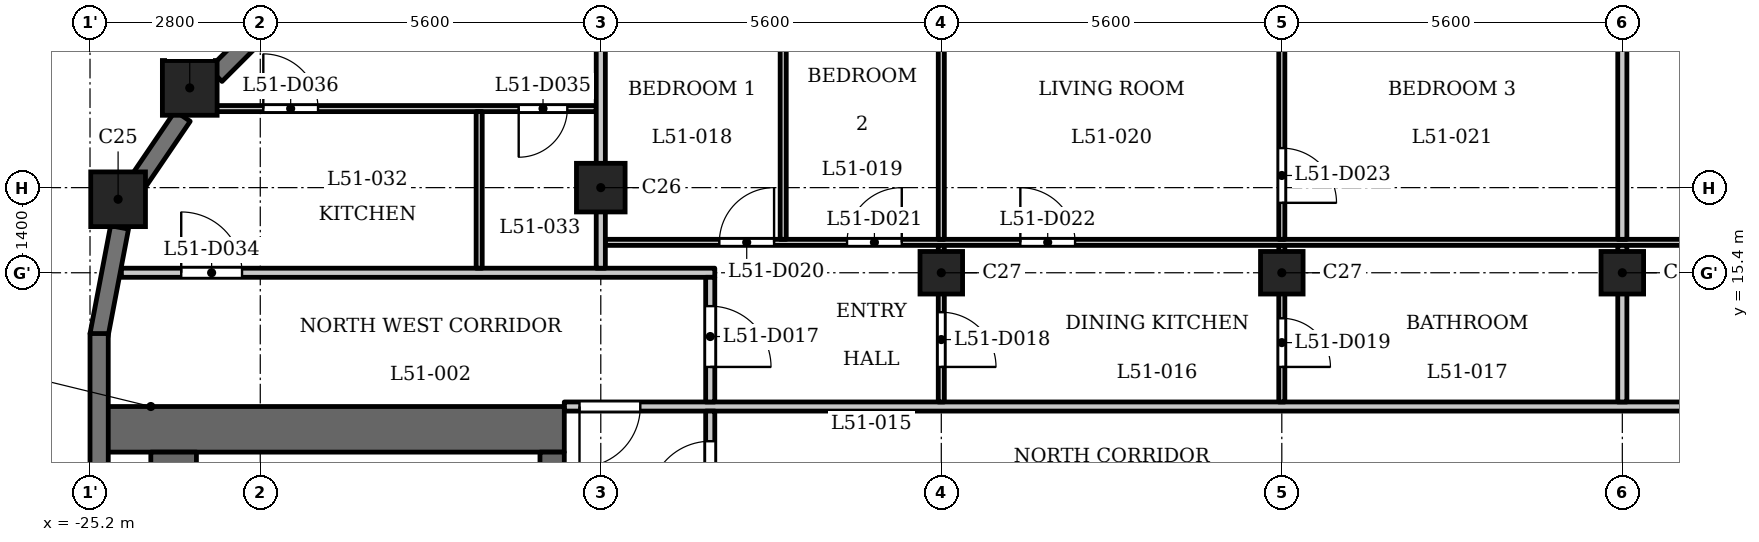
"""IFC4 building model, lengths in metres.
Left out: names, types, materials, properties, quantities, classifications, styles, units other than length and angle.
Written with IfcOpenShell. Run it as: python <this file> out.ifc"""

import sys

from ifc_helpers import new_model, si_unit, direction, frame, frame_2d, origin, origin_2d, place, context, subcontext, project, spatial, rectangle, extrude, element, fill, save


model = new_model("IFC4")
c1 = context("Model", 3, precision=1e-05, world=origin(), true_north=direction((0.0, 1.0)))
c2 = subcontext(c1, "Body", "Model", "MODEL_VIEW")
j1 = project(units=[si_unit("LENGTHUNIT", "METRE"), si_unit("PLANEANGLEUNIT", "RADIAN")], contexts=[c1])
p1 = place(None, origin())
s1 = spatial("IfcSite", under=j1, at=p1, CompositionType="ELEMENT")
p2 = place(p1, origin())
s2 = spatial("IfcBuilding", under=s1, at=p2, CompositionType="ELEMENT")
p3 = place(p2, frame((0.0, 0.0, 199.4)))
s3 = spatial("IfcBuildingStorey", under=s2, at=p3, CompositionType="ELEMENT", Elevation=199.4)
for number, where, z_axis, x_axis in (
    (1, (-23.56, 18.44, 0.0), (0.0, 0.0, 1.0), (1.0, 0.0, 0.0)),
    (2, (-24.738, 16.609, 0.0), (0.0, 0.0, 1.0), (1.0, 0.0, 0.0)),
):
    element("IfcColumn", number, at=place(p3, frame(where, z_axis=z_axis, x_axis=x_axis)), inside=s3, PredefinedType="COLUMN", context=c2, shape_type="SweptSolid", body=[
        extrude(rectangle(XDim=0.9, YDim=0.9, at=origin_2d()), origin(), (0.0, 0.0, 1.0), 3.5),
    ])
p4 = place(p3, frame((-16.8, 16.8, 0.0), z_axis=(0.0, 0.0, 1.0), x_axis=(1.0, 0.0, 0.0)))
e3 = element("IfcColumn", 3, at=p4, inside=s3, PredefinedType="COLUMN", context=c2, shape_type="SweptSolid", body=[
    extrude(rectangle(XDim=0.8, YDim=0.8, at=origin_2d()), origin(), (0.0, 0.0, 1.0), 3.5),
])
for number, where, z_axis, x_axis in (
    (4, (-11.2, 15.4, 0.0), (0.0, 0.0, 1.0), (1.0, 0.0, 0.0)),
    (5, (-5.6, 15.4, 0.0), (0.0, 0.0, 1.0), (1.0, 0.0, 0.0)),
    (6, (0.0, 15.4, 0.0), (0.0, 0.0, 1.0), (1.0, 0.0, 0.0)),
):
    element("IfcColumn", number, at=place(p3, frame(where, z_axis=z_axis, x_axis=x_axis)), inside=s3, PredefinedType="COLUMN", context=c2, shape_type="SweptSolid", body=[
        extrude(rectangle(XDim=0.7, YDim=0.7, at=origin_2d()), origin(), (0.0, 0.0, 1.0), 3.5),
    ])
p5 = place(p3, frame((-21.191, 20.597, 0.0), z_axis=(0.0, 0.0, 1.0), x_axis=(-0.707106781187, -0.707106781187, 0.0)))
e7 = element("IfcWall", 7, at=p5, inside=s3, PredefinedType="SOLIDWALL", context=c2, shape_type="SweptSolid", body=[
    extrude(rectangle(XDim=2.75, YDim=0.3, at=frame_2d((1.375, 0.0))), origin(), (0.0, 0.0, 1.0), 2.5),
])
p6 = place(p5, frame((0.775, 0.0, 0.6)))
e8 = element("IfcOpeningElement", 8, at=p6, cuts=e7, PredefinedType="OPENING", context=c2, shape_type="SweptSolid", body=[
    extrude(rectangle(XDim=1.2, YDim=1.55, at=frame_2d((0.6, 0.775))), frame((0.0, 0.16, 0.0), z_axis=(0.0, -1.0, 0.0), x_axis=(1.0, 0.0, 0.0)), (0.0, 0.0, 1.0), 0.32),
])
p7 = place(p3, frame((-23.676, 17.975, 0.0), z_axis=(0.0, 0.0, 1.0), x_axis=(-0.56200149592, -0.827136215253, 0.0)))
e9 = element("IfcWall", 9, at=p7, inside=s3, PredefinedType="SOLIDWALL", context=c2, shape_type="SweptSolid", body=[
    extrude(rectangle(XDim=1.277, YDim=0.3, at=frame_2d((0.639, 0.0))), origin(), (0.0, 0.0, 1.0), 2.5),
])
p8 = place(p3, frame((-24.714, 16.146, 0.0), z_axis=(0.0, 0.0, 1.0), x_axis=(-0.187348135549, -0.982293579388, 0.0)))
e10 = element("IfcWall", 10, at=p8, inside=s3, PredefinedType="SOLIDWALL", context=c2, shape_type="SweptSolid", body=[
    extrude(rectangle(XDim=1.806, YDim=0.3, at=frame_2d((0.903, 0.0))), origin(), (0.0, 0.0, 1.0), 2.5),
])
p9 = place(p3, frame((-25.05, 14.4, 0.0), z_axis=(0.0, 0.0, 1.0), x_axis=(0.0, -1.0, 0.0)))
e11 = element("IfcWall", 11, at=p9, inside=s3, PredefinedType="SOLIDWALL", context=c2, shape_type="SweptSolid", body=[
    extrude(rectangle(XDim=2.75, YDim=0.3, at=frame_2d((1.375, 0.0))), origin(), (0.0, 0.0, 1.0), 2.5),
])
p10 = place(p3, frame((-17.4, 12.825, 0.0), z_axis=(0.0, 0.0, 1.0), x_axis=(-1.0, 0.0, 0.0)))
e12 = element("IfcWall", 12, at=p10, inside=s3, PredefinedType="SHEAR", context=c2, shape_type="SweptSolid", body=[
    extrude(rectangle(XDim=7.6, YDim=0.75, at=frame_2d((3.8, 0.0))), origin(), (0.0, 0.0, 1.0), 3.2),
])
p11 = place(p3, frame((-17.6, -12.45, 0.0), z_axis=(0.0, 0.0, 1.0), x_axis=(0.0, 1.0, 0.0)))
e13 = element("IfcWall", 13, at=p11, inside=s3, PredefinedType="SHEAR", context=c2, shape_type="SweptSolid", body=[
    extrude(rectangle(XDim=24.9, YDim=0.4, at=frame_2d((12.45, 0.0))), origin(), (0.0, 0.0, 1.0), 3.2),
])
p12 = place(p11, frame((8.65, 0.0, 0.0)))
e14 = element("IfcOpeningElement", 14, at=p12, cuts=e13, PredefinedType="OPENING", context=c2, shape_type="SweptSolid", body=[
    extrude(rectangle(XDim=0.9, YDim=2.1, at=frame_2d((0.45, 1.05))), frame((0.0, 0.21, 0.0), z_axis=(0.0, -1.0, 0.0), x_axis=(1.0, 0.0, 0.0)), (0.0, 0.0, 1.0), 0.42),
])
p13 = place(p11, frame((15.6, 0.0, 0.0)))
e15 = element("IfcOpeningElement", 15, at=p13, cuts=e13, PredefinedType="OPENING", context=c2, shape_type="SweptSolid", body=[
    extrude(rectangle(XDim=1.1, YDim=2.1, at=frame_2d((0.55, 1.05))), frame((0.0, 0.21, 0.0), z_axis=(0.0, -1.0, 0.0), x_axis=(1.0, 0.0, 0.0)), (0.0, 0.0, 1.0), 0.42),
])
p14 = place(p11, frame((18.0, 0.0, 0.0)))
e16 = element("IfcOpeningElement", 16, at=p14, cuts=e13, PredefinedType="OPENING", context=c2, shape_type="SweptSolid", body=[
    extrude(rectangle(XDim=1.1, YDim=2.1, at=frame_2d((0.55, 1.05))), frame((0.0, 0.21, 0.0), z_axis=(0.0, -1.0, 0.0), x_axis=(1.0, 0.0, 0.0)), (0.0, 0.0, 1.0), 0.42),
])
p15 = place(p11, frame((23.025, 0.0, 0.0)))
e17 = element("IfcOpeningElement", 17, at=p15, cuts=e13, PredefinedType="OPENING", context=c2, shape_type="SweptSolid", body=[
    extrude(rectangle(XDim=1.1, YDim=2.1, at=frame_2d((0.55, 1.05))), frame((0.0, 0.21, 0.0), z_axis=(0.0, -1.0, 0.0), x_axis=(1.0, 0.0, 0.0)), (0.0, 0.0, 1.0), 0.42),
])
p16 = place(p11, frame((0.775, 0.0, 0.0)))
e18 = element("IfcOpeningElement", 18, at=p16, cuts=e13, PredefinedType="OPENING", context=c2, shape_type="SweptSolid", body=[
    extrude(rectangle(XDim=1.1, YDim=2.1, at=frame_2d((0.55, 1.05))), frame((0.0, 0.21, 0.0), z_axis=(0.0, -1.0, 0.0), x_axis=(1.0, 0.0, 0.0)), (0.0, 0.0, 1.0), 0.42),
])
p17 = place(p11, frame((12.925, 0.0, 0.0)))
e19 = element("IfcOpeningElement", 19, at=p17, cuts=e13, PredefinedType="OPENING", context=c2, shape_type="SweptSolid", body=[
    extrude(rectangle(XDim=1.8, YDim=2.1, at=frame_2d((0.9, 1.05))), frame((0.0, 0.21, 0.0), z_axis=(0.0, -1.0, 0.0), x_axis=(1.0, 0.0, 0.0)), (0.0, 0.0, 1.0), 0.42),
])
p18 = place(p3, frame((-23.825, -12.45, 0.0), z_axis=(0.0, 0.0, 1.0), x_axis=(0.0, 1.0, 0.0)))
e20 = element("IfcWall", 20, at=p18, inside=s3, PredefinedType="SHEAR", context=c2, shape_type="SweptSolid", body=[
    extrude(rectangle(XDim=24.9, YDim=0.75, at=frame_2d((12.45, 0.0))), origin(), (0.0, 0.0, 1.0), 3.2),
])
p19 = place(p3, frame((-17.4, 13.2, 0.0), z_axis=(0.0, 0.0, 1.0), x_axis=(1.0, 0.0, 0.0)))
e21 = element("IfcWall", 21, at=p19, inside=s3, PredefinedType="PARTITIONING", context=c2, shape_type="SweptSolid", body=[
    extrude(rectangle(XDim=34.8, YDim=0.15, at=frame_2d((17.4, 0.0))), origin(), (0.0, 0.0, 1.0), 3.2),
])
p20 = place(p19, frame((0.25, 0.0, 0.0)))
e22 = element("IfcOpeningElement", 22, at=p20, cuts=e21, PredefinedType="OPENING", context=c2, shape_type="SweptSolid", body=[
    extrude(rectangle(XDim=1.0, YDim=2.1, at=frame_2d((0.5, 1.05))), frame((0.0, 0.085, 0.0), z_axis=(0.0, -1.0, 0.0), x_axis=(1.0, 0.0, 0.0)), (0.0, 0.0, 1.0), 0.17),
])
p21 = place(p19, frame((33.65, 0.0, 0.0)))
e23 = element("IfcOpeningElement", 23, at=p21, cuts=e21, PredefinedType="OPENING", context=c2, shape_type="SweptSolid", body=[
    extrude(rectangle(XDim=1.0, YDim=2.1, at=frame_2d((0.5, 1.05))), frame((0.0, 0.085, 0.0), z_axis=(0.0, -1.0, 0.0), x_axis=(1.0, 0.0, 0.0)), (0.0, 0.0, 1.0), 0.17),
])
p22 = place(p3, frame((-24.684, 15.4, 0.0), z_axis=(0.0, 0.0, 1.0), x_axis=(1.0, 0.0, 0.0)))
e24 = element("IfcWall", 24, at=p22, inside=s3, PredefinedType="PARTITIONING", context=c2, shape_type="SweptSolid", body=[
    extrude(rectangle(XDim=9.759, YDim=0.15, at=frame_2d((4.879, 0.0))), origin(), (0.0, 0.0, 1.0), 3.2),
])
p23 = place(p22, frame((0.984, 0.0, 0.0)))
e25 = element("IfcOpeningElement", 25, at=p23, cuts=e24, PredefinedType="OPENING", context=c2, shape_type="SweptSolid", body=[
    extrude(rectangle(XDim=1.0, YDim=2.1, at=frame_2d((0.5, 1.05))), frame((0.0, 0.085, 0.0), z_axis=(0.0, -1.0, 0.0), x_axis=(1.0, 0.0, 0.0)), (0.0, 0.0, 1.0), 0.17),
])
p24 = place(p3, frame((-16.725, 15.9, 0.0), z_axis=(0.0, 0.0, 1.0), x_axis=(1.0, 0.0, 0.0)))
e26 = element("IfcWall", 26, at=p24, inside=s3, PredefinedType="PARTITIONING", context=c2, shape_type="SweptSolid", body=[
    extrude(rectangle(XDim=33.45, YDim=0.1, at=frame_2d((16.725, 0.0))), origin(), (0.0, 0.0, 1.0), 3.2),
])
p25 = place(p24, frame((1.875, 0.0, 0.0)))
e27 = element("IfcOpeningElement", 27, at=p25, cuts=e26, PredefinedType="OPENING", context=c2, shape_type="SweptSolid", body=[
    extrude(rectangle(XDim=0.9, YDim=2.1, at=frame_2d((0.45, 1.05))), frame((0.0, 0.06, 0.0), z_axis=(0.0, -1.0, 0.0), x_axis=(1.0, 0.0, 0.0)), (0.0, 0.0, 1.0), 0.12),
])
p26 = place(p24, frame((3.975, 0.0, 0.0)))
e28 = element("IfcOpeningElement", 28, at=p26, cuts=e26, PredefinedType="OPENING", context=c2, shape_type="SweptSolid", body=[
    extrude(rectangle(XDim=0.9, YDim=2.1, at=frame_2d((0.45, 1.05))), frame((0.0, 0.06, 0.0), z_axis=(0.0, -1.0, 0.0), x_axis=(1.0, 0.0, 0.0)), (0.0, 0.0, 1.0), 0.12),
])
p27 = place(p24, frame((6.825, 0.0, 0.0)))
e29 = element("IfcOpeningElement", 29, at=p27, cuts=e26, PredefinedType="OPENING", context=c2, shape_type="SweptSolid", body=[
    extrude(rectangle(XDim=0.9, YDim=2.1, at=frame_2d((0.45, 1.05))), frame((0.0, 0.06, 0.0), z_axis=(0.0, -1.0, 0.0), x_axis=(1.0, 0.0, 0.0)), (0.0, 0.0, 1.0), 0.12),
])
p28 = place(p24, frame((28.975, 0.0, 0.0)))
e30 = element("IfcOpeningElement", 30, at=p28, cuts=e26, PredefinedType="OPENING", context=c2, shape_type="SweptSolid", body=[
    extrude(rectangle(XDim=0.9, YDim=2.1, at=frame_2d((0.45, 1.05))), frame((0.0, 0.06, 0.0), z_axis=(0.0, -1.0, 0.0), x_axis=(1.0, 0.0, 0.0)), (0.0, 0.0, 1.0), 0.12),
])
p29 = place(p24, frame((30.725, 0.0, 0.0)))
e31 = element("IfcOpeningElement", 31, at=p29, cuts=e26, PredefinedType="OPENING", context=c2, shape_type="SweptSolid", body=[
    extrude(rectangle(XDim=0.9, YDim=2.1, at=frame_2d((0.45, 1.05))), frame((0.0, 0.06, 0.0), z_axis=(0.0, -1.0, 0.0), x_axis=(1.0, 0.0, 0.0)), (0.0, 0.0, 1.0), 0.12),
])
p30 = place(p24, frame((25.625, 0.0, 0.0)))
e32 = element("IfcOpeningElement", 32, at=p30, cuts=e26, PredefinedType="OPENING", context=c2, shape_type="SweptSolid", body=[
    extrude(rectangle(XDim=0.9, YDim=2.1, at=frame_2d((0.45, 1.05))), frame((0.0, 0.06, 0.0), z_axis=(0.0, -1.0, 0.0), x_axis=(1.0, 0.0, 0.0)), (0.0, 0.0, 1.0), 0.12),
])
p31 = place(p3, frame((-23.64, 18.1, 0.0), z_axis=(0.0, 0.0, 1.0), x_axis=(1.0, 0.0, 0.0)))
e33 = element("IfcWall", 33, at=p31, inside=s3, PredefinedType="PARTITIONING", context=c2, shape_type="SweptSolid", body=[
    extrude(rectangle(XDim=6.765, YDim=0.1, at=frame_2d((3.382, 0.0))), origin(), (0.0, 0.0, 1.0), 3.2),
])
p32 = place(p31, frame((5.49, 0.0, 0.0)))
e34 = element("IfcOpeningElement", 34, at=p32, cuts=e33, PredefinedType="OPENING", context=c2, shape_type="SweptSolid", body=[
    extrude(rectangle(XDim=0.8, YDim=2.1, at=frame_2d((0.4, 1.05))), frame((0.0, 0.06, 0.0), z_axis=(0.0, -1.0, 0.0), x_axis=(1.0, 0.0, 0.0)), (0.0, 0.0, 1.0), 0.12),
])
p33 = place(p31, frame((1.29, 0.0, 0.0)))
e35 = element("IfcOpeningElement", 35, at=p33, cuts=e33, PredefinedType="OPENING", context=c2, shape_type="SweptSolid", body=[
    extrude(rectangle(XDim=0.9, YDim=2.1, at=frame_2d((0.45, 1.05))), frame((0.0, 0.06, 0.0), z_axis=(0.0, -1.0, 0.0), x_axis=(1.0, 0.0, 0.0)), (0.0, 0.0, 1.0), 0.12),
])
p34 = place(p3, frame((-18.8, 15.475, 0.0), z_axis=(0.0, 0.0, 1.0), x_axis=(0.0, 1.0, 0.0)))
e36 = element("IfcWall", 36, at=p34, inside=s3, PredefinedType="PARTITIONING", context=c2, shape_type="SweptSolid", body=[
    extrude(rectangle(XDim=2.575, YDim=0.1, at=frame_2d((1.288, 0.0))), origin(), (0.0, 0.0, 1.0), 3.2),
])
p35 = place(p3, frame((-16.8, 15.475, 0.0), z_axis=(0.0, 0.0, 1.0), x_axis=(0.0, 1.0, 0.0)))
e37 = element("IfcWall", 37, at=p35, inside=s3, PredefinedType="PARTITIONING", context=c2, shape_type="SweptSolid", body=[
    extrude(rectangle(XDim=6.835, YDim=0.15, at=frame_2d((3.417, 0.0))), origin(), (0.0, 0.0, 1.0), 2.55),
])
p36 = place(p3, frame((-15.0, 6.769, 0.0), z_axis=(0.0, 0.0, 1.0), x_axis=(0.0, 1.0, 0.0)))
e38 = element("IfcWall", 38, at=p36, inside=s3, PredefinedType="PARTITIONING", context=c2, shape_type="SweptSolid", body=[
    extrude(rectangle(XDim=6.356, YDim=0.15, at=frame_2d((3.178, 0.0))), origin(), (0.0, 0.0, 1.0), 3.2),
])
p37 = place(p36, frame((4.86, 0.0, 0.0)))
e39 = element("IfcOpeningElement", 39, at=p37, cuts=e38, PredefinedType="OPENING", context=c2, shape_type="SweptSolid", body=[
    extrude(rectangle(XDim=1.0, YDim=2.1, at=frame_2d((0.5, 1.05))), frame((0.0, 0.085, 0.0), z_axis=(0.0, -1.0, 0.0), x_axis=(1.0, 0.0, 0.0)), (0.0, 0.0, 1.0), 0.17),
])
p38 = place(p3, frame((-15.0, 13.275, 0.0), z_axis=(0.0, 0.0, 1.0), x_axis=(0.0, 1.0, 0.0)))
e40 = element("IfcWall", 40, at=p38, inside=s3, PredefinedType="PARTITIONING", context=c2, shape_type="SweptSolid", body=[
    extrude(rectangle(XDim=2.05, YDim=0.15, at=frame_2d((1.025, 0.0))), origin(), (0.0, 0.0, 1.0), 3.2),
])
p39 = place(p38, frame((0.576, 0.0, 0.0)))
e41 = element("IfcOpeningElement", 41, at=p39, cuts=e40, PredefinedType="OPENING", context=c2, shape_type="SweptSolid", body=[
    extrude(rectangle(XDim=1.0, YDim=2.1, at=frame_2d((0.5, 1.05))), frame((0.0, 0.085, 0.0), z_axis=(0.0, -1.0, 0.0), x_axis=(1.0, 0.0, 0.0)), (0.0, 0.0, 1.0), 0.17),
])
p40 = place(p3, frame((-13.8, 15.95, 0.0), z_axis=(0.0, 0.0, 1.0), x_axis=(0.0, 1.0, 0.0)))
e42 = element("IfcWall", 42, at=p40, inside=s3, PredefinedType="PARTITIONING", context=c2, shape_type="SweptSolid", body=[
    extrude(rectangle(XDim=6.88, YDim=0.1, at=frame_2d((3.44, 0.0))), origin(), (0.0, 0.0, 1.0), 3.2),
])
p41 = place(p3, frame((-11.2, 13.275, 0.0), z_axis=(0.0, 0.0, 1.0), x_axis=(0.0, 1.0, 0.0)))
e43 = element("IfcWall", 43, at=p41, inside=s3, PredefinedType="PARTITIONING", context=c2, shape_type="SweptSolid", body=[
    extrude(rectangle(XDim=2.575, YDim=0.1, at=frame_2d((1.288, 0.0))), origin(), (0.0, 0.0, 1.0), 3.2),
])
p42 = place(p41, frame((0.576, 0.0, 0.0)))
e44 = element("IfcOpeningElement", 44, at=p42, cuts=e43, PredefinedType="OPENING", context=c2, shape_type="SweptSolid", body=[
    extrude(rectangle(XDim=0.9, YDim=2.1, at=frame_2d((0.45, 1.05))), frame((0.0, 0.06, 0.0), z_axis=(0.0, -1.0, 0.0), x_axis=(1.0, 0.0, 0.0)), (0.0, 0.0, 1.0), 0.12),
])
p43 = place(p3, frame((-11.2, 15.95, 0.0), z_axis=(0.0, 0.0, 1.0), x_axis=(0.0, 1.0, 0.0)))
e45 = element("IfcWall", 45, at=p43, inside=s3, PredefinedType="PARTITIONING", context=c2, shape_type="SweptSolid", body=[
    extrude(rectangle(XDim=6.13, YDim=0.1, at=frame_2d((3.065, 0.0))), origin(), (0.0, 0.0, 1.0), 3.2),
])
p44 = place(p3, frame((-5.6, 13.275, 0.0), z_axis=(0.0, 0.0, 1.0), x_axis=(0.0, 1.0, 0.0)))
e46 = element("IfcWall", 46, at=p44, inside=s3, PredefinedType="PARTITIONING", context=c2, shape_type="SweptSolid", body=[
    extrude(rectangle(XDim=2.575, YDim=0.1, at=frame_2d((1.288, 0.0))), origin(), (0.0, 0.0, 1.0), 3.2),
])
p45 = place(p44, frame((0.576, 0.0, 0.0)))
e47 = element("IfcOpeningElement", 47, at=p45, cuts=e46, PredefinedType="OPENING", context=c2, shape_type="SweptSolid", body=[
    extrude(rectangle(XDim=0.8, YDim=2.1, at=frame_2d((0.4, 1.05))), frame((0.0, 0.06, 0.0), z_axis=(0.0, -1.0, 0.0), x_axis=(1.0, 0.0, 0.0)), (0.0, 0.0, 1.0), 0.12),
])
p46 = place(p3, frame((-5.6, 15.95, 0.0), z_axis=(0.0, 0.0, 1.0), x_axis=(0.0, 1.0, 0.0)))
e48 = element("IfcWall", 48, at=p46, inside=s3, PredefinedType="PARTITIONING", context=c2, shape_type="SweptSolid", body=[
    extrude(rectangle(XDim=6.13, YDim=0.1, at=frame_2d((3.065, 0.0))), origin(), (0.0, 0.0, 1.0), 3.2),
])
p47 = place(p46, frame((0.6, 0.0, 0.0)))
e49 = element("IfcOpeningElement", 49, at=p47, cuts=e48, PredefinedType="OPENING", context=c2, shape_type="SweptSolid", body=[
    extrude(rectangle(XDim=0.9, YDim=2.1, at=frame_2d((0.45, 1.05))), frame((0.0, 0.06, 0.0), z_axis=(0.0, -1.0, 0.0), x_axis=(1.0, 0.0, 0.0)), (0.0, 0.0, 1.0), 0.12),
])
p48 = place(p3, frame((0.0, 13.275, 0.0), z_axis=(0.0, 0.0, 1.0), x_axis=(0.0, 1.0, 0.0)))
e50 = element("IfcWall", 50, at=p48, inside=s3, PredefinedType="PARTITIONING", context=c2, shape_type="SweptSolid", body=[
    extrude(rectangle(XDim=2.575, YDim=0.15, at=frame_2d((1.288, 0.0))), origin(), (0.0, 0.0, 1.0), 3.2),
])
p49 = place(p3, frame((0.0, 15.95, 0.0), z_axis=(0.0, 0.0, 1.0), x_axis=(0.0, 1.0, 0.0)))
e51 = element("IfcWall", 51, at=p49, inside=s3, PredefinedType="PARTITIONING", context=c2, shape_type="SweptSolid", body=[
    extrude(rectangle(XDim=6.13, YDim=0.15, at=frame_2d((3.065, 0.0))), origin(), (0.0, 0.0, 1.0), 3.2),
])
p50 = place(p37, origin())
e52 = element("IfcDoor", 52, at=p50, inside=s3, OperationType="SINGLE_SWING_RIGHT", PredefinedType="DOOR", context=c2, shape_type="SweptSolid", body=[
    extrude(rectangle(XDim=1.0, YDim=2.1, at=frame_2d((0.5, 1.05))), frame((0.0, 0.025, 0.0), z_axis=(0.0, -1.0, 0.0), x_axis=(1.0, 0.0, 0.0)), (0.0, 0.0, 1.0), 0.05),
])
fill(e39, e52)
p51 = place(p20, origin())
e53 = element("IfcDoor", 53, at=p51, inside=s3, OperationType="SINGLE_SWING_LEFT", PredefinedType="DOOR", context=c2, shape_type="SweptSolid", body=[
    extrude(rectangle(XDim=1.0, YDim=2.1, at=frame_2d((0.5, 1.05))), frame((0.0, 0.025, 0.0), z_axis=(0.0, -1.0, 0.0), x_axis=(1.0, 0.0, 0.0)), (0.0, 0.0, 1.0), 0.05),
])
fill(e22, e53)
p52 = place(p39, origin())
e54 = element("IfcDoor", 54, at=p52, inside=s3, OperationType="SINGLE_SWING_LEFT", PredefinedType="DOOR", context=c2, shape_type="SweptSolid", body=[
    extrude(rectangle(XDim=1.0, YDim=2.1, at=frame_2d((0.5, 1.05))), frame((0.0, 0.025, 0.0), z_axis=(0.0, -1.0, 0.0), x_axis=(1.0, 0.0, 0.0)), (0.0, 0.0, 1.0), 0.05),
])
fill(e41, e54)
p53 = place(p42, origin())
e55 = element("IfcDoor", 55, at=p53, inside=s3, OperationType="SINGLE_SWING_LEFT", PredefinedType="DOOR", context=c2, shape_type="SweptSolid", body=[
    extrude(rectangle(XDim=0.9, YDim=2.1, at=frame_2d((0.45, 1.05))), frame((0.0, 0.025, 0.0), z_axis=(0.0, -1.0, 0.0), x_axis=(1.0, 0.0, 0.0)), (0.0, 0.0, 1.0), 0.05),
])
fill(e44, e55)
p54 = place(p45, origin())
e56 = element("IfcDoor", 56, at=p54, inside=s3, OperationType="SINGLE_SWING_LEFT", PredefinedType="DOOR", context=c2, shape_type="SweptSolid", body=[
    extrude(rectangle(XDim=0.8, YDim=2.1, at=frame_2d((0.4, 1.05))), frame((0.0, 0.025, 0.0), z_axis=(0.0, -1.0, 0.0), x_axis=(1.0, 0.0, 0.0)), (0.0, 0.0, 1.0), 0.05),
])
fill(e47, e56)
p55 = place(p25, origin())
e57 = element("IfcDoor", 57, at=p55, inside=s3, OperationType="SINGLE_SWING_LEFT", PredefinedType="DOOR", context=c2, shape_type="SweptSolid", body=[
    extrude(rectangle(XDim=0.9, YDim=2.1, at=frame_2d((0.45, 1.05))), frame((0.0, 0.025, 0.0), z_axis=(0.0, -1.0, 0.0), x_axis=(1.0, 0.0, 0.0)), (0.0, 0.0, 1.0), 0.05),
])
fill(e27, e57)
p56 = place(p26, origin())
e58 = element("IfcDoor", 58, at=p56, inside=s3, OperationType="SINGLE_SWING_LEFT", PredefinedType="DOOR", context=c2, shape_type="SweptSolid", body=[
    extrude(rectangle(XDim=0.9, YDim=2.1, at=frame_2d((0.45, 1.05))), frame((0.0, 0.025, 0.0), z_axis=(0.0, -1.0, 0.0), x_axis=(1.0, 0.0, 0.0)), (0.0, 0.0, 1.0), 0.05),
])
fill(e28, e58)
p57 = place(p27, origin())
e59 = element("IfcDoor", 59, at=p57, inside=s3, OperationType="SINGLE_SWING_RIGHT", PredefinedType="DOOR", context=c2, shape_type="SweptSolid", body=[
    extrude(rectangle(XDim=0.9, YDim=2.1, at=frame_2d((0.45, 1.05))), frame((0.0, 0.025, 0.0), z_axis=(0.0, -1.0, 0.0), x_axis=(1.0, 0.0, 0.0)), (0.0, 0.0, 1.0), 0.05),
])
fill(e29, e59)
p58 = place(p47, origin())
e60 = element("IfcDoor", 60, at=p58, inside=s3, OperationType="SINGLE_SWING_LEFT", PredefinedType="DOOR", context=c2, shape_type="SweptSolid", body=[
    extrude(rectangle(XDim=0.9, YDim=2.1, at=frame_2d((0.45, 1.05))), frame((0.0, 0.025, 0.0), z_axis=(0.0, -1.0, 0.0), x_axis=(1.0, 0.0, 0.0)), (0.0, 0.0, 1.0), 0.05),
])
fill(e49, e60)
p59 = place(p23, origin())
e61 = element("IfcDoor", 61, at=p59, inside=s3, OperationType="SINGLE_SWING_RIGHT", PredefinedType="DOOR", context=c2, shape_type="SweptSolid", body=[
    extrude(rectangle(XDim=1.0, YDim=2.1, at=frame_2d((0.5, 1.05))), frame((0.0, 0.025, 0.0), z_axis=(0.0, -1.0, 0.0), x_axis=(1.0, 0.0, 0.0)), (0.0, 0.0, 1.0), 0.05),
])
fill(e25, e61)
p60 = place(p32, origin())
e62 = element("IfcDoor", 62, at=p60, inside=s3, OperationType="SINGLE_SWING_LEFT", PredefinedType="DOOR", context=c2, shape_type="SweptSolid", body=[
    extrude(rectangle(XDim=0.8, YDim=2.1, at=frame_2d((0.4, 1.05))), frame((0.0, 0.025, 0.0), z_axis=(0.0, -1.0, 0.0), x_axis=(1.0, 0.0, 0.0)), (0.0, 0.0, 1.0), 0.05),
])
fill(e34, e62)
p61 = place(p33, origin())
e63 = element("IfcDoor", 63, at=p61, inside=s3, OperationType="SINGLE_SWING_RIGHT", PredefinedType="DOOR", context=c2, shape_type="SweptSolid", body=[
    extrude(rectangle(XDim=0.9, YDim=2.1, at=frame_2d((0.45, 1.05))), frame((0.0, 0.025, 0.0), z_axis=(0.0, -1.0, 0.0), x_axis=(1.0, 0.0, 0.0)), (0.0, 0.0, 1.0), 0.05),
])
fill(e35, e63)
save(model, sys.argv[1])
